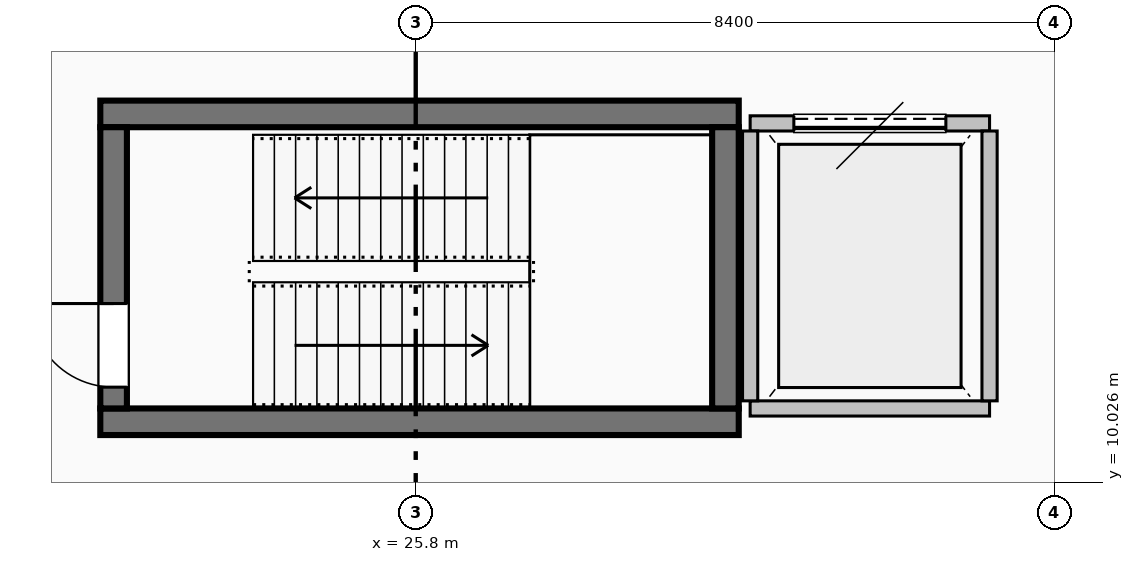
"""IFC4 building model, lengths in metres.
Left out: names, types, materials, properties, quantities, classifications, styles, units other than length and angle.
Written with IfcOpenShell. Run it as: python <this file> out.ifc"""

import sys

from ifc_helpers import new_model, si_unit, direction, frame, frame_2d, origin, place, context, subcontext, project, spatial, rectangle, extrude, element, fill, save


model = new_model("IFC4")
c1 = context("Model", 3, precision=1e-05, world=origin(), true_north=direction((0.0, 1.0)))
c2 = subcontext(c1, "Body", "Model", "MODEL_VIEW")
j1 = project(units=[si_unit("LENGTHUNIT", "METRE"), si_unit("PLANEANGLEUNIT", "RADIAN")], contexts=[c1])
p1 = place(None, origin())
s1 = spatial("IfcSite", under=j1, at=p1, CompositionType="ELEMENT")
p2 = place(p1, origin())
s2 = spatial("IfcBuilding", under=s1, at=p2, CompositionType="ELEMENT")
p3 = place(p2, frame((0.0, 0.0, -9.6)))
s3 = spatial("IfcBuildingStorey", under=s2, at=p3, CompositionType="ELEMENT", Elevation=-9.6)
for number, where, z_axis, x_axis in (
    (1, (21.65, 10.825, 0.0), (0.0, 0.0, 1.0), (1.0, 0.0, 0.0)),
    (2, (30.05, 14.875, 0.0), (0.0, 0.0, 1.0), (-1.0, 0.0, 0.0)),
):
    element("IfcWall", number, at=place(p3, frame(where, z_axis=z_axis, x_axis=x_axis)), inside=s3, PredefinedType="SHEAR", context=c2, shape_type="SweptSolid", body=[
        extrude(rectangle(XDim=8.4, YDim=0.35, at=frame_2d((4.2, 0.0))), origin(), (0.0, 0.0, 1.0), 4.5),
    ])
p4 = place(p3, frame((21.825, 11.0, 0.0), z_axis=(0.0, 0.0, 1.0), x_axis=(0.0, 1.0, 0.0)))
e3 = element("IfcWall", 3, at=p4, inside=s3, PredefinedType="SHEAR", context=c2, shape_type="SweptSolid", body=[
    extrude(rectangle(XDim=3.7, YDim=0.35, at=frame_2d((1.85, 0.0))), origin(), (0.0, 0.0, 1.0), 4.5),
])
p5 = place(p4, frame((0.28, 0.0, 0.0)))
e4 = element("IfcOpeningElement", 4, at=p5, cuts=e3, PredefinedType="OPENING", context=c2, shape_type="SweptSolid", body=[
    extrude(rectangle(XDim=1.1, YDim=2.08, at=frame_2d((0.55, 1.04))), frame((0.0, 0.185, 0.0), z_axis=(0.0, -1.0, 0.0), x_axis=(1.0, 0.0, 0.0)), (0.0, 0.0, 1.0), 0.37),
])
p6 = place(p3, frame((29.875, 14.7, 0.0), z_axis=(0.0, 0.0, 1.0), x_axis=(0.0, -1.0, 0.0)))
e5 = element("IfcWall", 5, at=p6, inside=s3, PredefinedType="SHEAR", context=c2, shape_type="SweptSolid", body=[
    extrude(rectangle(XDim=3.7, YDim=0.35, at=frame_2d((1.85, 0.0))), origin(), (0.0, 0.0, 1.0), 4.5),
])
p7 = place(p3, frame((30.2, 11.0, 0.0), z_axis=(0.0, 0.0, 1.0), x_axis=(1.0, 0.0, 0.0)))
e6 = element("IfcWall", 6, at=p7, inside=s3, PredefinedType="PARTITIONING", context=c2, shape_type="SweptSolid", body=[
    extrude(rectangle(XDim=3.15, YDim=0.2, at=frame_2d((1.575, 0.0))), origin(), (0.0, 0.0, 1.0), 4.492),
])
p8 = place(p3, frame((33.35, 14.75, 0.0), z_axis=(0.0, 0.0, 1.0), x_axis=(-1.0, 0.0, 0.0)))
e7 = element("IfcWall", 7, at=p8, inside=s3, PredefinedType="PARTITIONING", context=c2, shape_type="SweptSolid", body=[
    extrude(rectangle(XDim=3.15, YDim=0.2, at=frame_2d((1.575, 0.0))), origin(), (0.0, 0.0, 1.0), 4.492),
])
p9 = place(p8, frame((0.575, 0.0, 0.0)))
e8 = element("IfcOpeningElement", 8, at=p9, cuts=e7, PredefinedType="OPENING", context=c2, shape_type="SweptSolid", body=[
    extrude(rectangle(XDim=2.0, YDim=2.35, at=frame_2d((1.0, 1.175))), frame((0.0, 0.11, 0.0), z_axis=(0.0, -1.0, 0.0), x_axis=(1.0, 0.0, 0.0)), (0.0, 0.0, 1.0), 0.22),
])
for number, where, z_axis, x_axis in (
    (9, (30.2, 11.1, 0.0), (0.0, 0.0, 1.0), (0.0, 1.0, 0.0)),
    (10, (33.35, 14.65, 0.0), (0.0, 0.0, 1.0), (0.0, -1.0, 0.0)),
):
    element("IfcWall", number, at=place(p3, frame(where, z_axis=z_axis, x_axis=x_axis)), inside=s3, PredefinedType="PARTITIONING", context=c2, shape_type="SweptSolid", body=[
        extrude(rectangle(XDim=3.55, YDim=0.2, at=frame_2d((1.775, 0.0))), origin(), (0.0, 0.0, 1.0), 4.492),
    ])
p10 = place(p5, origin())
e11 = element("IfcDoor", 11, at=p10, inside=s3, OperationType="SINGLE_SWING_RIGHT", PredefinedType="DOOR", context=c2, shape_type="SweptSolid", body=[
    extrude(rectangle(XDim=1.1, YDim=2.08, at=frame_2d((0.55, 1.04))), frame((0.0, 0.025, 0.0), z_axis=(0.0, -1.0, 0.0), x_axis=(1.0, 0.0, 0.0)), (0.0, 0.0, 1.0), 0.05),
])
fill(e4, e11)
p11 = place(p9, origin())
e12 = element("IfcDoor", 12, at=p11, inside=s3, OperationType="SLIDING_TO_LEFT", PredefinedType="DOOR", context=c2, shape_type="SweptSolid", body=[
    extrude(rectangle(XDim=2.0, YDim=2.35, at=frame_2d((1.0, 1.175))), frame((0.0, 0.025, 0.0), z_axis=(0.0, -1.0, 0.0), x_axis=(1.0, 0.0, 0.0)), (0.0, 0.0, 1.0), 0.05),
])
fill(e8, e12)
save(model, sys.argv[1])
